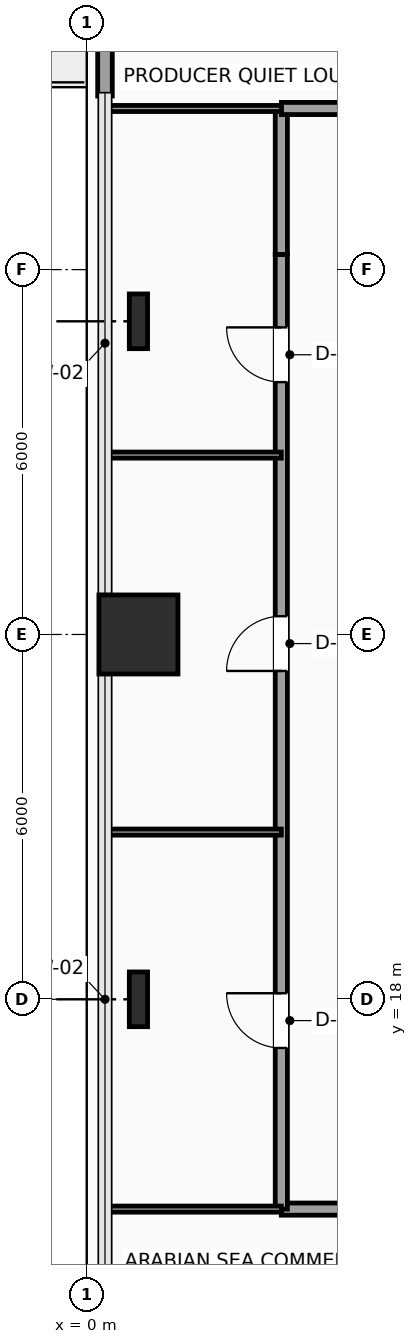
"""IFC4 building model, lengths in metres.
Left out: names, types, materials, properties, quantities, classifications, styles, units other than length and angle.
Written with IfcOpenShell. Run it as: python <this file> out.ifc"""

import sys

from ifc_helpers import new_model, si_unit, direction, frame, frame_2d, origin, origin_2d, place, context, subcontext, project, spatial, rectangle, i_section, extrude, element, fill, save


model = new_model("IFC4")
c1 = context("Model", 3, precision=1e-05, world=origin(), true_north=direction((0.0, 1.0)))
c2 = subcontext(c1, "Body", "Model", "MODEL_VIEW")
j1 = project(units=[si_unit("LENGTHUNIT", "METRE"), si_unit("PLANEANGLEUNIT", "RADIAN")], contexts=[c1])
p1 = place(None, origin())
s1 = spatial("IfcSite", under=j1, at=p1, CompositionType="ELEMENT")
p2 = place(p1, origin())
s2 = spatial("IfcBuilding", under=s1, at=p2, CompositionType="ELEMENT")
p3 = place(p2, frame((0.0, 0.0, 87.0)))
s3 = spatial("IfcBuildingStorey", under=s2, at=p3, CompositionType="ELEMENT", Elevation=87.0)
p4 = place(p3, frame((0.85, 18.0, 0.0), z_axis=(0.0, 0.0, 1.0), x_axis=(1.0, 0.0, 0.0)))
e1 = element("IfcColumn", 1, at=p4, inside=s3, PredefinedType="COLUMN", context=c2, shape_type="SweptSolid", body=[
    extrude(i_section(OverallWidth=0.3, OverallDepth=0.9, WebThickness=0.019, FlangeThickness=0.035, FilletRadius=0.03, at=origin_2d()), origin(), (0.0, 0.0, 1.0), 3.9),
])
p5 = place(p3, frame((0.85, 24.0, 0.0), z_axis=(0.0, 0.0, 1.0), x_axis=(1.0, 0.0, 0.0)))
e2 = element("IfcColumn", 2, at=p5, inside=s3, PredefinedType="COLUMN", context=c2, shape_type="SweptSolid", body=[
    extrude(rectangle(XDim=1.3, YDim=1.3, at=origin_2d()), origin(), (0.0, 0.0, 1.0), 3.9),
])
p6 = place(p3, frame((0.85, 29.15, 0.0), z_axis=(0.0, 0.0, 1.0), x_axis=(1.0, 0.0, 0.0)))
e3 = element("IfcColumn", 3, at=p6, inside=s3, PredefinedType="COLUMN", context=c2, shape_type="SweptSolid", body=[
    extrude(i_section(OverallWidth=0.3, OverallDepth=0.9, WebThickness=0.019, FlangeThickness=0.035, FilletRadius=0.03, at=origin_2d()), origin(), (0.0, 0.0, 1.0), 3.9),
])
p7 = place(p3, frame((0.3, 32.855, 0.0), z_axis=(0.0, 0.0, 1.0), x_axis=(0.0, 1.0, 0.0)))
e4 = element("IfcWall", 4, at=p7, inside=s3, PredefinedType="SOLIDWALL", context=c2, shape_type="SweptSolid", body=[
    extrude(rectangle(XDim=9.29, YDim=0.24, at=frame_2d((4.645, 0.0))), origin(), (0.0, 0.0, 1.0), 3.65),
])
p8 = place(p7, frame((4.2, 0.0, 0.0)))
e5 = element("IfcOpeningElement", 5, at=p8, cuts=e4, PredefinedType="OPENING", context=c2, shape_type="SweptSolid", body=[
    extrude(rectangle(XDim=1.05, YDim=2.2, at=frame_2d((0.525, 1.1))), frame((0.0, 0.13, 0.0), z_axis=(0.0, -1.0, 0.0), x_axis=(1.0, 0.0, 0.0)), (0.0, 0.0, 1.0), 0.26),
])
p9 = place(p3, frame((5.15, 14.55, 0.0), z_axis=(0.0, 0.0, 1.0), x_axis=(-1.0, 0.0, 0.0)))
e6 = element("IfcWall", 6, at=p9, inside=s3, PredefinedType="SOLIDWALL", context=c2, shape_type="SweptSolid", body=[
    extrude(rectangle(XDim=1.95, YDim=0.2, at=frame_2d((0.975, 0.0))), origin(), (0.0, 0.0, 1.0), 3.65),
])
p10 = place(p3, frame((3.2, 14.55, 0.0), z_axis=(0.0, 0.0, 1.0), x_axis=(0.0, 1.0, 0.0)))
e7 = element("IfcWall", 7, at=p10, inside=s3, PredefinedType="SOLIDWALL", context=c2, shape_type="SweptSolid", body=[
    extrude(rectangle(XDim=15.7, YDim=0.2, at=frame_2d((7.85, 0.0))), origin(), (0.0, 0.0, 1.0), 3.65),
])
p11 = place(p10, frame((2.65, 0.0, 0.0)))
e8 = element("IfcOpeningElement", 8, at=p11, cuts=e7, PredefinedType="OPENING", context=c2, shape_type="SweptSolid", body=[
    extrude(rectangle(XDim=0.9, YDim=2.1, at=frame_2d((0.45, 1.05))), frame((0.0, 0.11, 0.0), z_axis=(0.0, -1.0, 0.0), x_axis=(1.0, 0.0, 0.0)), (0.0, 0.0, 1.0), 0.22),
])
p12 = place(p10, frame((8.85, 0.0, 0.0)))
e9 = element("IfcOpeningElement", 9, at=p12, cuts=e7, PredefinedType="OPENING", context=c2, shape_type="SweptSolid", body=[
    extrude(rectangle(XDim=0.9, YDim=2.1, at=frame_2d((0.45, 1.05))), frame((0.0, 0.11, 0.0), z_axis=(0.0, -1.0, 0.0), x_axis=(1.0, 0.0, 0.0)), (0.0, 0.0, 1.0), 0.22),
])
p13 = place(p10, frame((13.6, 0.0, 0.0)))
e10 = element("IfcOpeningElement", 10, at=p13, cuts=e7, PredefinedType="OPENING", context=c2, shape_type="SweptSolid", body=[
    extrude(rectangle(XDim=0.9, YDim=2.1, at=frame_2d((0.45, 1.05))), frame((0.0, 0.11, 0.0), z_axis=(0.0, -1.0, 0.0), x_axis=(1.0, 0.0, 0.0)), (0.0, 0.0, 1.0), 0.22),
])
p14 = place(p3, frame((3.2, 30.25, 0.0), z_axis=(0.0, 0.0, 1.0), x_axis=(0.0, 1.0, 0.0)))
e11 = element("IfcWall", 11, at=p14, inside=s3, PredefinedType="SOLIDWALL", context=c2, shape_type="SweptSolid", body=[
    extrude(rectangle(XDim=2.4, YDim=0.2, at=frame_2d((1.2, 0.0))), origin(), (0.0, 0.0, 1.0), 3.65),
])
p15 = place(p3, frame((3.2, 32.65, 0.0), z_axis=(0.0, 0.0, 1.0), x_axis=(1.0, 0.0, 0.0)))
e12 = element("IfcWall", 12, at=p15, inside=s3, PredefinedType="SOLIDWALL", context=c2, shape_type="SweptSolid", body=[
    extrude(rectangle(XDim=2.05, YDim=0.2, at=frame_2d((1.025, 0.0))), origin(), (0.0, 0.0, 1.0), 3.65),
])
p16 = place(p3, frame((0.35, 0.35, 0.0), z_axis=(0.0, 0.0, 1.0), x_axis=(-0.003524555588, 0.999993788735, 0.0)))
e13 = element("IfcWall", 13, at=p16, inside=s3, PredefinedType="PARTITIONING", context=c2, shape_type="SweptSolid", body=[
    extrude(rectangle(XDim=14.2, YDim=0.1, at=frame_2d((7.1, 0.0))), origin(), (0.0, 0.0, 1.0), 3.65),
])
for number, where, z_axis, x_axis in (
    (14, (0.3, 14.55, 0.0), (0.0, 0.0, 1.0), (1.0, 0.0, 0.0)),
    (15, (0.3, 20.75, 0.0), (0.0, 0.0, 1.0), (1.0, 0.0, 0.0)),
    (16, (0.3, 26.95, 0.0), (0.0, 0.0, 1.0), (1.0, 0.0, 0.0)),
    (17, (0.3, 32.65, 0.0), (0.0, 0.0, 1.0), (1.0, 0.0, 0.0)),
):
    element("IfcWall", number, at=place(p3, frame(where, z_axis=z_axis, x_axis=x_axis)), inside=s3, PredefinedType="PARTITIONING", context=c2, shape_type="SweptSolid", body=[
        extrude(rectangle(XDim=2.9, YDim=0.1, at=frame_2d((1.45, 0.0))), origin(), (0.0, 0.0, 1.0), 3.65),
    ])
p17 = place(p11, origin())
e18 = element("IfcDoor", 18, at=p17, inside=s3, OperationType="SINGLE_SWING_RIGHT", PredefinedType="DOOR", context=c2, shape_type="SweptSolid", body=[
    extrude(rectangle(XDim=0.9, YDim=2.1, at=frame_2d((0.45, 1.05))), frame((0.0, 0.025, 0.0), z_axis=(0.0, -1.0, 0.0), x_axis=(1.0, 0.0, 0.0)), (0.0, 0.0, 1.0), 0.05),
])
fill(e8, e18)
p18 = place(p12, origin())
e19 = element("IfcDoor", 19, at=p18, inside=s3, OperationType="SINGLE_SWING_LEFT", PredefinedType="DOOR", context=c2, shape_type="SweptSolid", body=[
    extrude(rectangle(XDim=0.9, YDim=2.1, at=frame_2d((0.45, 1.05))), frame((0.0, 0.025, 0.0), z_axis=(0.0, -1.0, 0.0), x_axis=(1.0, 0.0, 0.0)), (0.0, 0.0, 1.0), 0.05),
])
fill(e9, e19)
p19 = place(p13, origin())
e20 = element("IfcDoor", 20, at=p19, inside=s3, OperationType="SINGLE_SWING_RIGHT", PredefinedType="DOOR", context=c2, shape_type="SweptSolid", body=[
    extrude(rectangle(XDim=0.9, YDim=2.1, at=frame_2d((0.45, 1.05))), frame((0.0, 0.025, 0.0), z_axis=(0.0, -1.0, 0.0), x_axis=(1.0, 0.0, 0.0)), (0.0, 0.0, 1.0), 0.05),
])
fill(e10, e20)
save(model, sys.argv[1])
